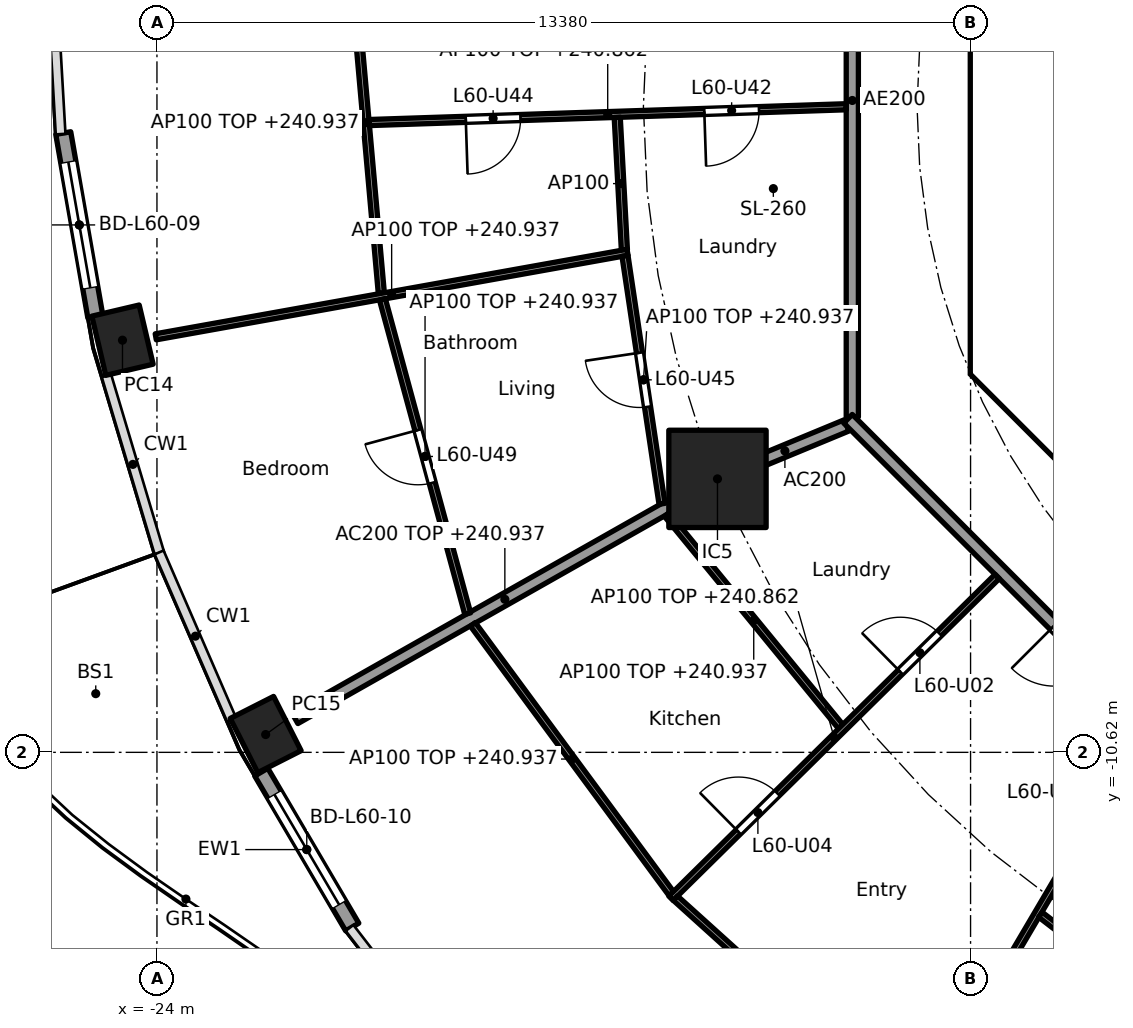
"""IFC4 building model, lengths in metres.
Left out: names, types, materials, properties, quantities, classifications, styles, units other than length and angle.
Written with IfcOpenShell. Run it as: python <this file> out.ifc"""

import sys

from ifc_helpers import new_model, si_unit, direction, frame, frame_2d, origin, origin_2d, place, context, subcontext, project, spatial, polyline, rectangle, hollow_rectangle, outline, extrude, element, fill, save


model = new_model("IFC4")
c1 = context("Model", 3, precision=1e-05, world=origin(), true_north=direction((0.0, 1.0)))
c2 = subcontext(c1, "Body", "Model", "MODEL_VIEW")
j1 = project(units=[si_unit("LENGTHUNIT", "METRE"), si_unit("PLANEANGLEUNIT", "RADIAN")], contexts=[c1])
p1 = place(None, origin())
s1 = spatial("IfcSite", under=j1, at=p1, CompositionType="ELEMENT")
p2 = place(p1, origin())
s2 = spatial("IfcBuilding", under=s1, at=p2, CompositionType="ELEMENT")
p3 = place(p2, frame((0.0, 0.0, 238.1)))
s3 = spatial("IfcBuildingStorey", under=s2, at=p3, CompositionType="ELEMENT", Elevation=238.1)
for number, where, z_axis, x_axis in (
    (1, (-24.567, -3.842, 0.0), (0.0, 0.0, 1.0), (0.229, -0.973, 0.0)),
    (2, (-22.212, -10.327, 0.0), (0.0, 0.0, 1.0), (0.452, -0.892, 0.0)),
):
    element("IfcColumn", number, at=place(p3, frame(where, z_axis=z_axis, x_axis=x_axis)), inside=s3, PredefinedType="COLUMN", context=c2, shape_type="SweptSolid", body=[
        extrude(hollow_rectangle(XDim=1.0, YDim=0.8, WallThickness=0.032, at=origin_2d()), origin(), (0.0, 0.0, 1.0), 3.7),
    ])
p4 = place(p3, frame((-14.782, -6.123, 0.0), z_axis=(0.0, 0.0, 1.0), x_axis=(1.0, 0.0, 0.0)))
e3 = element("IfcColumn", 3, at=p4, inside=s3, PredefinedType="COLUMN", context=c2, shape_type="SweptSolid", body=[
    extrude(rectangle(XDim=1.6, YDim=1.6, at=origin_2d()), origin(), (0.0, 0.0, 1.0), 3.7),
])
p5 = place(p3, frame((-25.013, -3.457, 0.0), z_axis=(0.0, 0.0, 1.0), x_axis=(-0.172241318156, 0.985054784426, 0.0)))
e4 = element("IfcWall", 4, at=p5, inside=s3, PredefinedType="SOLIDWALL", context=c2, shape_type="SweptSolid", body=[
    extrude(rectangle(XDim=3.067, YDim=0.25, at=frame_2d((1.534, 0.0))), origin(), (0.0, 0.0, 1.0), 3.44),
])
p6 = place(p5, frame((0.484, 0.0, 0.0)))
e5 = element("IfcOpeningElement", 5, at=p6, cuts=e4, PredefinedType="OPENING", context=c2, shape_type="SweptSolid", body=[
    extrude(rectangle(XDim=2.1, YDim=2.4, at=frame_2d((1.05, 1.2))), frame((0.0, 0.135, 0.0), z_axis=(0.0, -1.0, 0.0), x_axis=(1.0, 0.0, 0.0)), (0.0, 0.0, 1.0), 0.27),
])
p7 = place(p3, frame((-20.788, -13.493, 0.0), z_axis=(0.0, 0.0, 1.0), x_axis=(-0.506294090973, 0.862360883532, 0.0)))
e6 = element("IfcWall", 6, at=p7, inside=s3, PredefinedType="SOLIDWALL", context=c2, shape_type="SweptSolid", body=[
    extrude(rectangle(XDim=2.955, YDim=0.25, at=frame_2d((1.477, 0.0))), origin(), (0.0, 0.0, 1.0), 3.44),
])
p8 = place(p7, frame((0.427, 0.0, 0.0)))
e7 = element("IfcOpeningElement", 7, at=p8, cuts=e6, PredefinedType="OPENING", context=c2, shape_type="SweptSolid", body=[
    extrude(rectangle(XDim=2.1, YDim=2.4, at=frame_2d((1.05, 1.2))), frame((0.0, 0.135, 0.0), z_axis=(0.0, -1.0, 0.0), x_axis=(1.0, 0.0, 0.0)), (0.0, 0.0, 1.0), 0.27),
])
p9 = place(p3, frame((-10.325, 3.801, 0.0), z_axis=(0.0, 0.0, 1.0), x_axis=(0.0, -1.0, 0.0)))
e8 = element("IfcWall", 8, at=p9, inside=s3, PredefinedType="SHEAR", context=c2, shape_type="SweptSolid", body=[
    extrude(rectangle(XDim=7.602, YDim=0.6, at=frame_2d((3.801, 0.0))), origin(), (0.0, 0.0, 1.0), 3.44),
])
p10 = place(p9, frame((0.651, 0.0, 0.0)))
e9 = element("IfcOpeningElement", 9, at=p10, cuts=e8, PredefinedType="OPENING", context=c2, shape_type="SweptSolid", body=[
    extrude(rectangle(XDim=1.5, YDim=2.1, at=frame_2d((0.75, 1.05))), frame((0.0, 0.31, 0.0), z_axis=(0.0, -1.0, 0.0), x_axis=(1.0, 0.0, 0.0)), (0.0, 0.0, 1.0), 0.62),
])
p11 = place(p9, frame((5.451, 0.0, 0.0)))
e10 = element("IfcOpeningElement", 10, at=p11, cuts=e8, PredefinedType="OPENING", context=c2, shape_type="SweptSolid", body=[
    extrude(rectangle(XDim=1.5, YDim=2.1, at=frame_2d((0.75, 1.05))), frame((0.0, 0.31, 0.0), z_axis=(0.0, -1.0, 0.0), x_axis=(1.0, 0.0, 0.0)), (0.0, 0.0, 1.0), 0.62),
])
p12 = place(p3, frame((-9.988, -4.613, 0.0), z_axis=(0.0, 0.0, 1.0), x_axis=(0.707106781187, -0.707106781187, 0.0)))
e11 = element("IfcWall", 11, at=p12, inside=s3, PredefinedType="SHEAR", context=c2, shape_type="SweptSolid", body=[
    extrude(rectangle(XDim=7.602, YDim=0.6, at=frame_2d((3.801, 0.0))), origin(), (0.0, 0.0, 1.0), 3.44),
])
p13 = place(p12, frame((6.151, 0.0, 0.0)))
e12 = element("IfcOpeningElement", 12, at=p13, cuts=e11, PredefinedType="OPENING", context=c2, shape_type="SweptSolid", body=[
    extrude(rectangle(XDim=1.1, YDim=2.1, at=frame_2d((0.55, 1.05))), frame((0.0, 0.31, 0.0), z_axis=(0.0, -1.0, 0.0), x_axis=(1.0, 0.0, 0.0)), (0.0, 0.0, 1.0), 0.62),
])
p14 = place(p3, origin())
e13 = element("IfcWall", 13, at=p14, inside=s3, PredefinedType="SHEAR", context=c2, shape_type="SweptSolid", body=[
    extrude(outline(polyline([(-10.625, -3.801), (-10.025, -3.801), (-10.025, -4.152), (-9.776, -4.401), (-10.2, -4.825), (-10.625, -4.401), (-10.625, -3.801)])), origin(), (0.0, 0.0, 1.0), 3.44),
])
p15 = place(p3, frame((-10.025, -4.0, 0.0), z_axis=(0.0, 0.0, 1.0), x_axis=(1.0, 0.0, 0.0)))
e14 = element("IfcWall", 14, at=p15, inside=s3, PredefinedType="PARTITIONING", context=c2, shape_type="SweptSolid", body=[
    extrude(rectangle(XDim=3.325, YDim=0.2, at=frame_2d((1.662, 0.0))), origin(), (0.0, 0.0, 1.0), 3.44),
])
p16 = place(p3, frame((-12.657, -5.243, 0.0), z_axis=(0.0, 0.0, 1.0), x_axis=(-0.923859888513, -0.38273085373, 0.0)))
e15 = element("IfcWall", 15, at=p16, inside=s3, PredefinedType="PARTITIONING", context=c2, shape_type="SweptSolid", body=[
    extrude(rectangle(XDim=2.199, YDim=0.2, at=frame_2d((1.1, 0.0))), origin(), (0.0, 0.0, 1.0), 3.44),
])
p17 = place(p3, frame((-14.825, -6.148, 0.0), z_axis=(0.0, 0.0, 1.0), x_axis=(-0.870099576105, -0.492875975944, 0.0)))
e16 = element("IfcWall", 16, at=p17, inside=s3, PredefinedType="PARTITIONING", context=c2, shape_type="SweptSolid", body=[
    extrude(rectangle(XDim=7.937, YDim=0.2, at=frame_2d((3.969, 0.0))), origin(), (0.0, 0.0, 1.0), 2.837),
])
p18 = place(p3, frame((-12.565, 5.304, 0.0), z_axis=(0.0, 0.0, 1.0), x_axis=(0.0, -1.0, 0.0)))
e17 = element("IfcWall", 17, at=p18, inside=s3, PredefinedType="PARTITIONING", context=c2, shape_type="SweptSolid", body=[
    extrude(rectangle(XDim=10.409, YDim=0.2, at=frame_2d((5.205, 0.0))), origin(), (0.0, 0.0, 1.0), 3.44),
])
p19 = place(p18, frame((3.07, 0.0, 0.0)))
e18 = element("IfcOpeningElement", 18, at=p19, cuts=e17, PredefinedType="OPENING", context=c2, shape_type="SweptSolid", body=[
    extrude(rectangle(XDim=1.0, YDim=2.1, at=frame_2d((0.5, 1.05))), frame((0.0, 0.11, 0.0), z_axis=(0.0, -1.0, 0.0), x_axis=(1.0, 0.0, 0.0)), (0.0, 0.0, 1.0), 0.22),
])
p20 = place(p3, frame((-12.635, -5.134, 0.0), z_axis=(0.0, 0.0, 1.0), x_axis=(0.707106781187, -0.707106781187, 0.0)))
e19 = element("IfcWall", 19, at=p20, inside=s3, PredefinedType="PARTITIONING", context=c2, shape_type="SweptSolid", body=[
    extrude(rectangle(XDim=10.609, YDim=0.2, at=frame_2d((5.305, 0.0))), origin(), (0.0, 0.0, 1.0), 3.44),
])
p21 = place(p20, frame((4.804, 0.0, 0.0)))
e20 = element("IfcOpeningElement", 20, at=p21, cuts=e19, PredefinedType="OPENING", context=c2, shape_type="SweptSolid", body=[
    extrude(rectangle(XDim=1.0, YDim=2.1, at=frame_2d((0.5, 1.05))), frame((0.0, 0.11, 0.0), z_axis=(0.0, -1.0, 0.0), x_axis=(1.0, 0.0, 0.0)), (0.0, 0.0, 1.0), 0.22),
])
p22 = place(p3, frame((-20.81, 2.542, 0.0), z_axis=(0.0, 0.0, 1.0), x_axis=(0.088621920298, -0.996065336834, 0.0)))
e21 = element("IfcWall", 21, at=p22, inside=s3, PredefinedType="PARTITIONING", context=c2, shape_type="SweptSolid", body=[
    extrude(rectangle(XDim=5.636, YDim=0.1, at=frame_2d((2.818, 0.0))), origin(), (0.0, 0.0, 1.0), 2.837),
])
p23 = place(p3, frame((-12.665, -0.003, 0.0), z_axis=(0.0, 0.0, 1.0), x_axis=(-0.999453263957, -0.033063169315, 0.0)))
e22 = element("IfcWall", 22, at=p23, inside=s3, PredefinedType="PARTITIONING", context=c2, shape_type="SweptSolid", body=[
    extrude(rectangle(XDim=7.849, YDim=0.1, at=frame_2d((3.925, 0.0))), origin(), (0.0, 0.0, 1.0), 2.762),
])
p24 = place(p23, frame((1.435, 0.0, 0.0)))
e23 = element("IfcOpeningElement", 23, at=p24, cuts=e22, PredefinedType="OPENING", context=c2, shape_type="SweptSolid", body=[
    extrude(rectangle(XDim=0.9, YDim=2.1, at=frame_2d((0.45, 1.05))), frame((0.0, 0.06, 0.0), z_axis=(0.0, -1.0, 0.0), x_axis=(1.0, 0.0, 0.0)), (0.0, 0.0, 1.0), 0.12),
])
p25 = place(p23, frame((5.36, 0.0, 0.0)))
e24 = element("IfcOpeningElement", 24, at=p25, cuts=e22, PredefinedType="OPENING", context=c2, shape_type="SweptSolid", body=[
    extrude(rectangle(XDim=0.9, YDim=2.1, at=frame_2d((0.45, 1.05))), frame((0.0, 0.06, 0.0), z_axis=(0.0, -1.0, 0.0), x_axis=(1.0, 0.0, 0.0)), (0.0, 0.0, 1.0), 0.12),
])
p26 = place(p3, frame((-16.431, -0.178, 0.0), z_axis=(0.0, 0.0, 1.0), x_axis=(0.053951127036, -0.998543577362, 0.0)))
e25 = element("IfcWall", 25, at=p26, inside=s3, PredefinedType="PARTITIONING", context=c2, shape_type="SweptSolid", body=[
    extrude(rectangle(XDim=2.181, YDim=0.1, at=frame_2d((1.091, 0.0))), origin(), (0.0, 0.0, 1.0), 3.44),
])
p27 = place(p3, frame((-16.261, -2.397, 0.0), z_axis=(0.0, 0.0, 1.0), x_axis=(-0.984329983721, -0.17633627859, 0.0)))
e26 = element("IfcWall", 26, at=p27, inside=s3, PredefinedType="PARTITIONING", context=c2, shape_type="SweptSolid", body=[
    extrude(rectangle(XDim=7.882, YDim=0.1, at=frame_2d((3.941, 0.0))), origin(), (0.0, 0.0, 1.0), 2.837),
])
p28 = place(p3, frame((-16.303, -2.455, 0.0), z_axis=(0.0, 0.0, 1.0), x_axis=(0.147711951447, -0.9890304239, 0.0)))
e27 = element("IfcWall", 27, at=p28, inside=s3, PredefinedType="PARTITIONING", context=c2, shape_type="SweptSolid", body=[
    extrude(rectangle(XDim=4.122, YDim=0.1, at=frame_2d((2.061, 0.0))), origin(), (0.0, 0.0, 1.0), 2.837),
])
p29 = place(p28, frame((1.611, 0.0, 0.0)))
e28 = element("IfcOpeningElement", 28, at=p29, cuts=e27, PredefinedType="OPENING", context=c2, shape_type="SweptSolid", body=[
    extrude(rectangle(XDim=0.9, YDim=2.1, at=frame_2d((0.45, 1.05))), frame((0.0, 0.06, 0.0), z_axis=(0.0, -1.0, 0.0), x_axis=(1.0, 0.0, 0.0)), (0.0, 0.0, 1.0), 0.12),
])
p30 = place(p3, frame((-20.292, -3.17, 0.0), z_axis=(0.0, 0.0, 1.0), x_axis=(0.26187906236, -0.965100697698, 0.0)))
e29 = element("IfcWall", 29, at=p30, inside=s3, PredefinedType="PARTITIONING", context=c2, shape_type="SweptSolid", body=[
    extrude(rectangle(XDim=5.356, YDim=0.1, at=frame_2d((2.678, 0.0))), origin(), (0.0, 0.0, 1.0), 2.837),
])
p31 = place(p30, frame((2.228, 0.0, 0.0)))
e30 = element("IfcOpeningElement", 30, at=p31, cuts=e29, PredefinedType="OPENING", context=c2, shape_type="SweptSolid", body=[
    extrude(rectangle(XDim=0.9, YDim=2.1, at=frame_2d((0.45, 1.05))), frame((0.0, 0.06, 0.0), z_axis=(0.0, -1.0, 0.0), x_axis=(1.0, 0.0, 0.0)), (0.0, 0.0, 1.0), 0.12),
])
p32 = place(p3, frame((-15.616, -6.708, 0.0), z_axis=(0.0, 0.0, 1.0), x_axis=(0.634074410447, -0.77327203623, 0.0)))
e31 = element("IfcWall", 31, at=p32, inside=s3, PredefinedType="PARTITIONING", context=c2, shape_type="SweptSolid", body=[
    extrude(rectangle(XDim=4.511, YDim=0.1, at=frame_2d((2.255, 0.0))), origin(), (0.0, 0.0, 1.0), 2.837),
])
p33 = place(p3, frame((-18.804, -8.516, 0.0), z_axis=(0.0, 0.0, 1.0), x_axis=(0.593233851441, -0.80503018422, 0.0)))
e32 = element("IfcWall", 32, at=p33, inside=s3, PredefinedType="PARTITIONING", context=c2, shape_type="SweptSolid", body=[
    extrude(rectangle(XDim=5.502, YDim=0.1, at=frame_2d((2.751, 0.0))), origin(), (0.0, 0.0, 1.0), 2.837),
])
p34 = place(p3, frame((-10.183, -7.728, 0.0), z_axis=(0.0, 0.0, 1.0), x_axis=(-0.711869910979, -0.702311348223, 0.0)))
e33 = element("IfcWall", 33, at=p34, inside=s3, PredefinedType="PARTITIONING", context=c2, shape_type="SweptSolid", body=[
    extrude(rectangle(XDim=7.535, YDim=0.1, at=frame_2d((3.767, 0.0))), origin(), (0.0, 0.0, 1.0), 2.762),
])
p35 = place(p34, frame((1.335, 0.0, 0.0)))
e34 = element("IfcOpeningElement", 34, at=p35, cuts=e33, PredefinedType="OPENING", context=c2, shape_type="SweptSolid", body=[
    extrude(rectangle(XDim=0.9, YDim=2.1, at=frame_2d((0.45, 1.05))), frame((0.0, 0.06, 0.0), z_axis=(0.0, -1.0, 0.0), x_axis=(1.0, 0.0, 0.0)), (0.0, 0.0, 1.0), 0.12),
])
p36 = place(p34, frame((5.077, 0.0, 0.0)))
e35 = element("IfcOpeningElement", 35, at=p36, cuts=e33, PredefinedType="OPENING", context=c2, shape_type="SweptSolid", body=[
    extrude(rectangle(XDim=0.9, YDim=2.1, at=frame_2d((0.45, 1.05))), frame((0.0, 0.06, 0.0), z_axis=(0.0, -1.0, 0.0), x_axis=(1.0, 0.0, 0.0)), (0.0, 0.0, 1.0), 0.12),
])
p37 = place(p3, frame((-15.474, -13.019, 0.0), z_axis=(0.0, 0.0, 1.0), x_axis=(0.742348572616, -0.670013878017, 0.0)))
e36 = element("IfcWall", 36, at=p37, inside=s3, PredefinedType="PARTITIONING", context=c2, shape_type="SweptSolid", body=[
    extrude(rectangle(XDim=5.319, YDim=0.1, at=frame_2d((2.66, 0.0))), origin(), (0.0, 0.0, 1.0), 2.837),
])
p38 = place(p37, frame((2.21, 0.0, 0.0)))
e37 = element("IfcOpeningElement", 37, at=p38, cuts=e36, PredefinedType="OPENING", context=c2, shape_type="SweptSolid", body=[
    extrude(rectangle(XDim=0.9, YDim=2.1, at=frame_2d((0.45, 1.05))), frame((0.0, 0.06, 0.0), z_axis=(0.0, -1.0, 0.0), x_axis=(1.0, 0.0, 0.0)), (0.0, 0.0, 1.0), 0.12),
])
p39 = place(p3, frame((-7.709, -10.198, 0.0), z_axis=(0.0, 0.0, 1.0), x_axis=(-0.507355901053, -0.8617366127, 0.0)))
e38 = element("IfcWall", 38, at=p39, inside=s3, PredefinedType="PARTITIONING", context=c2, shape_type="SweptSolid", body=[
    extrude(rectangle(XDim=11.025, YDim=0.1, at=frame_2d((5.512, 0.0))), origin(), (0.0, 0.0, 1.0), 2.762),
])
p40 = place(p39, frame((1.326, 0.0, 0.0)))
e39 = element("IfcOpeningElement", 39, at=p40, cuts=e38, PredefinedType="OPENING", context=c2, shape_type="SweptSolid", body=[
    extrude(rectangle(XDim=0.9, YDim=2.1, at=frame_2d((0.45, 1.05))), frame((0.0, 0.06, 0.0), z_axis=(0.0, -1.0, 0.0), x_axis=(1.0, 0.0, 0.0)), (0.0, 0.0, 1.0), 0.12),
])
p41 = place(p39, frame((5.05, 0.0, 0.0)))
e40 = element("IfcOpeningElement", 40, at=p41, cuts=e38, PredefinedType="OPENING", context=c2, shape_type="SweptSolid", body=[
    extrude(rectangle(XDim=0.9, YDim=2.1, at=frame_2d((0.45, 1.05))), frame((0.0, 0.06, 0.0), z_axis=(0.0, -1.0, 0.0), x_axis=(1.0, 0.0, 0.0)), (0.0, 0.0, 1.0), 0.12),
])
p42 = place(p39, frame((8.787, 0.0, 0.0)))
e41 = element("IfcOpeningElement", 41, at=p42, cuts=e38, PredefinedType="OPENING", context=c2, shape_type="SweptSolid", body=[
    extrude(rectangle(XDim=0.9, YDim=2.1, at=frame_2d((0.45, 1.05))), frame((0.0, 0.06, 0.0), z_axis=(0.0, -1.0, 0.0), x_axis=(1.0, 0.0, 0.0)), (0.0, 0.0, 1.0), 0.12),
])
p43 = place(p3, frame((-9.471, -13.289, 0.0), z_axis=(0.0, 0.0, 1.0), x_axis=(0.792227074489, -0.610226402614, 0.0)))
e42 = element("IfcWall", 42, at=p43, inside=s3, PredefinedType="PARTITIONING", context=c2, shape_type="SweptSolid", body=[
    extrude(rectangle(XDim=3.866, YDim=0.1, at=frame_2d((1.933, 0.0))), origin(), (0.0, 0.0, 1.0), 2.837),
])
p44 = place(p6, origin())
e43 = element("IfcDoor", 43, at=p44, inside=s3, OperationType="SLIDING_TO_LEFT", PredefinedType="DOOR", context=c2, shape_type="SweptSolid", body=[
    extrude(rectangle(XDim=2.1, YDim=2.4, at=frame_2d((1.05, 1.2))), frame((0.0, 0.025, 0.0), z_axis=(0.0, -1.0, 0.0), x_axis=(1.0, 0.0, 0.0)), (0.0, 0.0, 1.0), 0.05),
])
fill(e5, e43)
p45 = place(p8, origin())
e44 = element("IfcDoor", 44, at=p45, inside=s3, OperationType="SLIDING_TO_LEFT", PredefinedType="DOOR", context=c2, shape_type="SweptSolid", body=[
    extrude(rectangle(XDim=2.1, YDim=2.4, at=frame_2d((1.05, 1.2))), frame((0.0, 0.025, 0.0), z_axis=(0.0, -1.0, 0.0), x_axis=(1.0, 0.0, 0.0)), (0.0, 0.0, 1.0), 0.05),
])
fill(e7, e44)
p46 = place(p11, origin())
e45 = element("IfcDoor", 45, at=p46, inside=s3, OperationType="DOUBLE_DOOR_SINGLE_SWING", PredefinedType="DOOR", context=c2, shape_type="SweptSolid", body=[
    extrude(rectangle(XDim=1.5, YDim=2.1, at=frame_2d((0.75, 1.05))), frame((0.0, 0.025, 0.0), z_axis=(0.0, -1.0, 0.0), x_axis=(1.0, 0.0, 0.0)), (0.0, 0.0, 1.0), 0.05),
])
fill(e10, e45)
p47 = place(p21, frame((1.0, 0.0, 0.0), x_axis=(-1.0, 0.0, 0.0)))
e46 = element("IfcDoor", 46, at=p47, inside=s3, OperationType="SINGLE_SWING_RIGHT", PredefinedType="DOOR", context=c2, shape_type="SweptSolid", body=[
    extrude(rectangle(XDim=1.0, YDim=2.1, at=frame_2d((0.5, 1.05))), frame((0.0, 0.025, 0.0), z_axis=(0.0, -1.0, 0.0), x_axis=(1.0, 0.0, 0.0)), (0.0, 0.0, 1.0), 0.05),
])
fill(e20, e46)
p48 = place(p35, frame((0.9, 0.0, 0.0), x_axis=(-1.0, 0.0, 0.0)))
e47 = element("IfcDoor", 47, at=p48, inside=s3, OperationType="SINGLE_SWING_LEFT", PredefinedType="DOOR", context=c2, shape_type="SweptSolid", body=[
    extrude(rectangle(XDim=0.9, YDim=2.1, at=frame_2d((0.45, 1.05))), frame((0.0, 0.025, 0.0), z_axis=(0.0, -1.0, 0.0), x_axis=(1.0, 0.0, 0.0)), (0.0, 0.0, 1.0), 0.05),
])
fill(e34, e47)
p49 = place(p36, frame((0.9, 0.0, 0.0), x_axis=(-1.0, 0.0, 0.0)))
e48 = element("IfcDoor", 48, at=p49, inside=s3, OperationType="SINGLE_SWING_LEFT", PredefinedType="DOOR", context=c2, shape_type="SweptSolid", body=[
    extrude(rectangle(XDim=0.9, YDim=2.1, at=frame_2d((0.45, 1.05))), frame((0.0, 0.025, 0.0), z_axis=(0.0, -1.0, 0.0), x_axis=(1.0, 0.0, 0.0)), (0.0, 0.0, 1.0), 0.05),
])
fill(e35, e48)
p50 = place(p24, origin())
e49 = element("IfcDoor", 49, at=p50, inside=s3, OperationType="SINGLE_SWING_RIGHT", PredefinedType="DOOR", context=c2, shape_type="SweptSolid", body=[
    extrude(rectangle(XDim=0.9, YDim=2.1, at=frame_2d((0.45, 1.05))), frame((0.0, 0.025, 0.0), z_axis=(0.0, -1.0, 0.0), x_axis=(1.0, 0.0, 0.0)), (0.0, 0.0, 1.0), 0.05),
])
fill(e23, e49)
p51 = place(p25, origin())
e50 = element("IfcDoor", 50, at=p51, inside=s3, OperationType="SINGLE_SWING_RIGHT", PredefinedType="DOOR", context=c2, shape_type="SweptSolid", body=[
    extrude(rectangle(XDim=0.9, YDim=2.1, at=frame_2d((0.45, 1.05))), frame((0.0, 0.025, 0.0), z_axis=(0.0, -1.0, 0.0), x_axis=(1.0, 0.0, 0.0)), (0.0, 0.0, 1.0), 0.05),
])
fill(e24, e50)
p52 = place(p29, frame((0.9, 0.0, 0.0), x_axis=(-1.0, 0.0, 0.0)))
e51 = element("IfcDoor", 51, at=p52, inside=s3, OperationType="SINGLE_SWING_RIGHT", PredefinedType="DOOR", context=c2, shape_type="SweptSolid", body=[
    extrude(rectangle(XDim=0.9, YDim=2.1, at=frame_2d((0.45, 1.05))), frame((0.0, 0.025, 0.0), z_axis=(0.0, -1.0, 0.0), x_axis=(1.0, 0.0, 0.0)), (0.0, 0.0, 1.0), 0.05),
])
fill(e28, e51)
p53 = place(p31, frame((0.9, 0.0, 0.0), x_axis=(-1.0, 0.0, 0.0)))
e52 = element("IfcDoor", 52, at=p53, inside=s3, OperationType="SINGLE_SWING_RIGHT", PredefinedType="DOOR", context=c2, shape_type="SweptSolid", body=[
    extrude(rectangle(XDim=0.9, YDim=2.1, at=frame_2d((0.45, 1.05))), frame((0.0, 0.025, 0.0), z_axis=(0.0, -1.0, 0.0), x_axis=(1.0, 0.0, 0.0)), (0.0, 0.0, 1.0), 0.05),
])
fill(e30, e52)
save(model, sys.argv[1])
